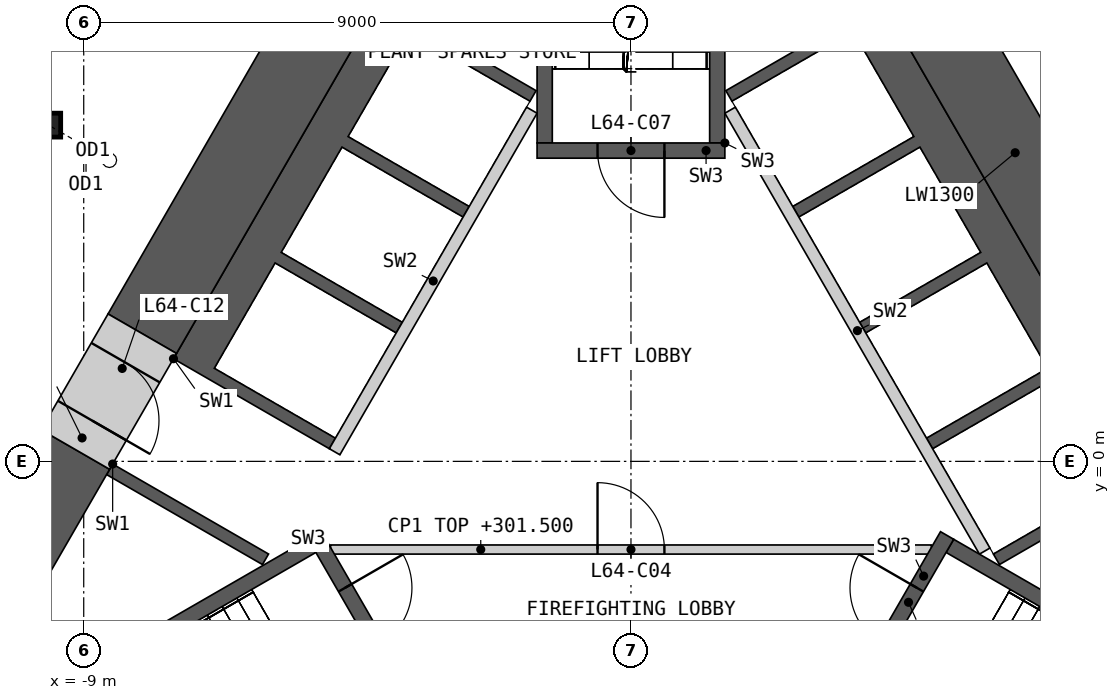
"""IFC4 building model, lengths in metres.
Left out: names, types, materials, properties, quantities, classifications, styles, units other than length and angle.
Written with IfcOpenShell. Run it as: python <this file> out.ifc"""

import sys

from ifc_helpers import new_model, si_unit, direction, frame, frame_2d, origin, origin_2d, place, context, subcontext, project, spatial, polyline, rectangle, i_section, outline, extrude, element, fill, save


model = new_model("IFC4")
c1 = context("Model", 3, precision=1e-05, world=origin(), true_north=direction((0.0, 1.0)))
c2 = subcontext(c1, "Body", "Model", "MODEL_VIEW")
j1 = project(units=[si_unit("LENGTHUNIT", "METRE"), si_unit("PLANEANGLEUNIT", "RADIAN")], contexts=[c1])
p1 = place(None, origin())
s1 = spatial("IfcSite", under=j1, at=p1, CompositionType="ELEMENT")
p2 = place(p1, origin())
s2 = spatial("IfcBuilding", under=s1, at=p2, CompositionType="ELEMENT")
p3 = place(p2, frame((0.0, 0.0, 287.8)))
s3 = spatial("IfcBuildingStorey", under=s2, at=p3, CompositionType="ELEMENT", Elevation=287.8)
p4 = place(p3, frame((-9.578, 5.53, 0.0), z_axis=(0.071186891711, -0.041085403321, 0.996616483951), x_axis=(0.499868889286, 0.866101087359, 0.0)))
e1 = element("IfcColumn", 1, at=p4, inside=s3, PredefinedType="COLUMN", context=c2, shape_type="SweptSolid", body=[
    extrude(i_section(OverallWidth=0.399, OverallDepth=0.393, WebThickness=0.023, FlangeThickness=0.037, at=origin_2d()), frame((0.0, 0.0, 0.016)), (0.0, 0.0, 1.0), 14.015),
])
p5 = place(p3, origin())
e2 = element("IfcWall", 2, at=p5, inside=s3, PredefinedType="SHEAR", context=c2, shape_type="SweptSolid", body=[
    extrude(outline(polyline([(4.124, 7.577), (8.624, -0.217), (8.231, -0.444), (6.061, -1.697), (5.96, -1.524), (7.952, -0.374), (6.952, 1.358), (4.96, 0.208), (4.861, 0.381), (6.852, 1.531), (5.852, 3.263), (3.861, 2.113), (3.76, 2.287), (5.752, 3.437), (4.752, 5.169), (2.76, 4.019), (2.66, 4.192), (4.652, 5.342), (3.652, 7.074), (1.66, 5.924), (1.561, 6.097), (3.731, 7.35), (4.124, 7.577)])), origin(), (0.0, 0.0, 1.0), 13.7),
])
p6 = place(p3, frame((5.817, -1.476, 0.0), z_axis=(0.0, 0.0, 1.0), x_axis=(-0.500002616675, 0.866023893041, 0.0)))
e3 = element("IfcWall", 3, at=p6, inside=s3, PredefinedType="SOLIDWALL", context=c2, shape_type="SweptSolid", body=[
    extrude(rectangle(XDim=8.373, YDim=0.2, at=frame_2d((4.187, 0.0))), origin(), (0.0, 0.0, 1.0), 13.7),
])
p7 = place(p3, origin())
e4 = element("IfcWall", 4, at=p7, inside=s3, PredefinedType="SHEAR", context=c2, shape_type="SweptSolid", body=[
    extrude(outline(polyline([(-7.524, 1.688), (-4.124, 7.577), (-3.731, 7.35), (-1.561, 6.097), (-1.66, 5.924), (-3.652, 7.074), (-4.652, 5.342), (-2.66, 4.192), (-2.76, 4.019), (-4.752, 5.169), (-5.752, 3.437), (-3.76, 2.287), (-3.861, 2.113), (-5.852, 3.263), (-6.852, 1.531), (-4.861, 0.381), (-4.96, 0.208), (-7.131, 1.461), (-7.524, 1.688)])), origin(), (0.0, 0.0, 1.0), 13.7),
])
p8 = place(p3, origin())
e5 = element("IfcWall", 5, at=p8, inside=s3, PredefinedType="SHEAR", context=c2, shape_type="SweptSolid", body=[
    extrude(outline(polyline([(-8.524, -0.044), (-8.131, -0.271), (-5.96, -1.524), (-6.061, -1.697), (-8.231, -0.444), (-8.624, -0.217), (-8.524, -0.044)])), origin(), (0.0, 0.0, 1.0), 13.7),
])
p9 = place(p3, frame((-1.631, 5.776, 0.0), z_axis=(0.0, 0.0, 1.0), x_axis=(-0.499992876559, -0.866029516466, 0.0)))
e6 = element("IfcWall", 6, at=p9, inside=s3, PredefinedType="SOLIDWALL", context=c2, shape_type="SweptSolid", body=[
    extrude(rectangle(XDim=6.486, YDim=0.2, at=frame_2d((3.243, 0.0))), origin(), (0.0, 0.0, 1.0), 13.7),
])
p10 = place(p3, frame((-4.941, -1.45, 0.0), z_axis=(0.0, 0.0, 1.0), x_axis=(1.0, 0.0, 0.0)))
e7 = element("IfcWall", 7, at=p10, inside=s3, PredefinedType="PARTITIONING", context=c2, shape_type="SweptSolid", body=[
    extrude(rectangle(XDim=9.882, YDim=0.15, at=frame_2d((4.941, 0.0))), origin(), (0.0, 0.0, 1.0), 13.7),
])
p11 = place(p10, frame((4.391, 0.0, 0.0)))
e8 = element("IfcOpeningElement", 8, at=p11, cuts=e7, PredefinedType="OPENING", context=c2, shape_type="SweptSolid", body=[
    extrude(rectangle(XDim=1.1, YDim=2.1, at=frame_2d((0.55, 1.05))), frame((0.0, 0.085, 0.0), z_axis=(0.0, -1.0, 0.0), x_axis=(1.0, 0.0, 0.0)), (0.0, 0.0, 1.0), 0.17),
])
p12 = place(p3, origin())
e9 = element("IfcWall", 9, at=p12, inside=s3, PredefinedType="SHEAR", context=c2, shape_type="SweptSolid", body=[
    extrude(outline(polyline([(-5.307, -1.281), (-10.374, -4.206), (-10.032, -4.298), (-5.182, -1.498), (-5.307, -1.281)])), origin(), (0.0, 0.0, 1.0), 13.7),
])
p13 = place(p3, frame((-5.199, -1.219, 0.0), z_axis=(0.0, 0.0, 1.0), x_axis=(0.499982516597, -0.866035497597, 0.0)))
e10 = element("IfcWall", 10, at=p13, inside=s3, PredefinedType="SHEAR", context=c2, shape_type="SweptSolid", body=[
    extrude(rectangle(XDim=3.088, YDim=0.25, at=frame_2d((1.544, 0.0))), origin(), (0.0, 0.0, 1.0), 13.7),
])
p14 = place(p13, frame((0.994, 0.0, 0.0)))
e11 = element("IfcOpeningElement", 11, at=p14, cuts=e10, PredefinedType="OPENING", context=c2, shape_type="SweptSolid", body=[
    extrude(rectangle(XDim=1.1, YDim=2.1, at=frame_2d((0.55, 1.05))), frame((0.0, 0.135, 0.0), z_axis=(0.0, -1.0, 0.0), x_axis=(1.0, 0.0, 0.0)), (0.0, 0.0, 1.0), 0.27),
])
p15 = place(p3, origin())
e12 = element("IfcWall", 12, at=p15, inside=s3, PredefinedType="SHEAR", context=c2, shape_type="SweptSolid", body=[
    extrude(outline(polyline([(10.032, -4.298), (10.374, -4.206), (5.307, -1.281), (5.182, -1.498), (10.032, -4.298)])), origin(), (0.0, 0.0, 1.0), 13.7),
])
p16 = place(p3, frame((3.655, -3.893, 0.0), z_axis=(0.0, 0.0, 1.0), x_axis=(0.499982516597, 0.866035497597, 0.0)))
e13 = element("IfcWall", 13, at=p16, inside=s3, PredefinedType="SHEAR", context=c2, shape_type="SweptSolid", body=[
    extrude(rectangle(XDim=3.088, YDim=0.25, at=frame_2d((1.544, 0.0))), origin(), (0.0, 0.0, 1.0), 13.7),
])
p17 = place(p16, frame((0.994, 0.0, 0.0)))
e14 = element("IfcOpeningElement", 14, at=p17, cuts=e13, PredefinedType="OPENING", context=c2, shape_type="SweptSolid", body=[
    extrude(rectangle(XDim=1.1, YDim=2.1, at=frame_2d((0.55, 1.05))), frame((0.0, 0.135, 0.0), z_axis=(0.0, -1.0, 0.0), x_axis=(1.0, 0.0, 0.0)), (0.0, 0.0, 1.0), 0.27),
])
p18 = place(p3, origin())
e15 = element("IfcWall", 15, at=p18, inside=s3, PredefinedType="SHEAR", context=c2, shape_type="SweptSolid", body=[
    extrude(outline(polyline([(1.544, 5.237), (1.544, 11.087), (1.294, 10.837), (1.294, 5.237), (1.544, 5.237)])), origin(), (0.0, 0.0, 1.0), 13.7),
])
p19 = place(p3, origin())
e16 = element("IfcWall", 16, at=p19, inside=s3, PredefinedType="SHEAR", context=c2, shape_type="SweptSolid", body=[
    extrude(outline(polyline([(-1.294, 10.837), (-1.544, 11.087), (-1.544, 5.237), (-1.294, 5.237), (-1.294, 10.837)])), origin(), (0.0, 0.0, 1.0), 13.7),
])
p20 = place(p3, frame((1.544, 5.112, 0.0), z_axis=(0.0, 0.0, 1.0), x_axis=(-1.0, 0.0, 0.0)))
e17 = element("IfcWall", 17, at=p20, inside=s3, PredefinedType="SHEAR", context=c2, shape_type="SweptSolid", body=[
    extrude(rectangle(XDim=3.088, YDim=0.25, at=frame_2d((1.544, 0.0))), origin(), (0.0, 0.0, 1.0), 13.7),
])
p21 = place(p20, frame((0.994, 0.0, 0.0)))
e18 = element("IfcOpeningElement", 18, at=p21, cuts=e17, PredefinedType="OPENING", context=c2, shape_type="SweptSolid", body=[
    extrude(rectangle(XDim=1.1, YDim=2.1, at=frame_2d((0.55, 1.05))), frame((0.0, 0.135, 0.0), z_axis=(0.0, -1.0, 0.0), x_axis=(1.0, 0.0, 0.0)), (0.0, 0.0, 1.0), 0.27),
])
p22 = place(p3, frame((10.081, -1.441, 0.0), z_axis=(0.0, 0.0, 1.0), x_axis=(-0.500012180433, 0.866018371294, 0.0)))
e19 = element("IfcWall", 19, at=p22, inside=s3, PredefinedType="SHEAR", context=c2, shape_type="SweptSolid", body=[
    extrude(rectangle(XDim=15.05, YDim=1.3, at=frame_2d((7.525, 0.0))), origin(), (0.0, 0.0, 1.0), 13.7),
])
p23 = place(p3, frame((-4.636, 7.99, 0.0), z_axis=(0.0, 0.0, 1.0), x_axis=(-0.500022813292, -0.866012232124, 0.0)))
e20 = element("IfcWall", 20, at=p23, inside=s3, PredefinedType="SHEAR", context=c2, shape_type="SweptSolid", body=[
    extrude(rectangle(XDim=6.802, YDim=1.3, at=frame_2d((3.401, 0.0))), origin(), (0.0, 0.0, 1.0), 13.7),
])
p24 = place(p3, frame((-9.137, 0.195, 0.0), z_axis=(0.0, 0.0, 1.0), x_axis=(-0.499985697398, -0.866033661238, 0.0)))
e21 = element("IfcWall", 21, at=p24, inside=s3, PredefinedType="SHEAR", context=c2, shape_type="SweptSolid", body=[
    extrude(rectangle(XDim=4.362, YDim=1.3, at=frame_2d((2.181, 0.0))), origin(), (0.0, 0.0, 1.0), 13.7),
])
p25 = place(p3, frame((-8.037, 2.1, 0.0), z_axis=(0.0, 0.0, 1.0), x_axis=(-0.50002983664, -0.866008176907, 0.0)))
e22 = element("IfcWall", 22, at=p25, inside=s3, PredefinedType="SHEAR", context=c2, shape_type="SweptSolid", body=[
    extrude(rectangle(XDim=2.2, YDim=1.3, at=frame_2d((1.1, 0.0))), origin(), (0.0, 0.0, 1.0), 13.7),
])
p26 = place(p25, frame((0.55, 0.0, 0.0)))
e23 = element("IfcOpeningElement", 23, at=p26, cuts=e22, PredefinedType="OPENING", context=c2, shape_type="SweptSolid", body=[
    extrude(rectangle(XDim=1.1, YDim=2.1, at=frame_2d((0.55, 1.05))), frame((0.0, 0.66, 0.0), z_axis=(0.0, -1.0, 0.0), x_axis=(1.0, 0.0, 0.0)), (0.0, 0.0, 1.0), 1.32),
])
p27 = place(p3, frame((-18.118, -6.06, 0.0), z_axis=(0.0, 0.0, 1.0), x_axis=(0.49999867524, 0.866026168633, 0.0)))
e24 = element("IfcWall", 24, at=p27, inside=s3, PredefinedType="PARTITIONING", context=c2, shape_type="SweptSolid", body=[
    extrude(rectangle(XDim=28.614, YDim=0.2, at=frame_2d((14.307, 0.0))), origin(), (0.0, 0.0, 1.0), 13.7),
])
p28 = place(p27, frame((1.351, 0.0, 0.0)))
e25 = element("IfcOpeningElement", 25, at=p28, cuts=e24, PredefinedType="OPENING", context=c2, shape_type="SweptSolid", body=[
    extrude(rectangle(XDim=1.2, YDim=2.1, at=frame_2d((0.6, 1.05))), frame((0.0, 0.11, 0.0), z_axis=(0.0, -1.0, 0.0), x_axis=(1.0, 0.0, 0.0)), (0.0, 0.0, 1.0), 0.22),
])
p29 = place(p27, frame((5.953, 0.0, 0.0)))
e26 = element("IfcOpeningElement", 26, at=p29, cuts=e24, PredefinedType="OPENING", context=c2, shape_type="SweptSolid", body=[
    extrude(rectangle(XDim=1.2, YDim=2.1, at=frame_2d((0.6, 1.05))), frame((0.0, 0.11, 0.0), z_axis=(0.0, -1.0, 0.0), x_axis=(1.0, 0.0, 0.0)), (0.0, 0.0, 1.0), 0.22),
])
p30 = place(p27, frame((11.156, 0.0, 0.0)))
e27 = element("IfcOpeningElement", 27, at=p30, cuts=e24, PredefinedType="OPENING", context=c2, shape_type="SweptSolid", body=[
    extrude(rectangle(XDim=1.2, YDim=2.1, at=frame_2d((0.6, 1.05))), frame((0.0, 0.11, 0.0), z_axis=(0.0, -1.0, 0.0), x_axis=(1.0, 0.0, 0.0)), (0.0, 0.0, 1.0), 0.22),
])
p31 = place(p27, frame((16.259, 0.0, 0.0)))
e28 = element("IfcOpeningElement", 28, at=p31, cuts=e24, PredefinedType="OPENING", context=c2, shape_type="SweptSolid", body=[
    extrude(rectangle(XDim=1.2, YDim=2.1, at=frame_2d((0.6, 1.05))), frame((0.0, 0.11, 0.0), z_axis=(0.0, -1.0, 0.0), x_axis=(1.0, 0.0, 0.0)), (0.0, 0.0, 1.0), 0.22),
])
p32 = place(p27, frame((21.461, 0.0, 0.0)))
e29 = element("IfcOpeningElement", 29, at=p32, cuts=e24, PredefinedType="OPENING", context=c2, shape_type="SweptSolid", body=[
    extrude(rectangle(XDim=1.2, YDim=2.1, at=frame_2d((0.6, 1.05))), frame((0.0, 0.11, 0.0), z_axis=(0.0, -1.0, 0.0), x_axis=(1.0, 0.0, 0.0)), (0.0, 0.0, 1.0), 0.22),
])
p33 = place(p27, frame((26.064, 0.0, 0.0)))
e30 = element("IfcOpeningElement", 30, at=p33, cuts=e24, PredefinedType="OPENING", context=c2, shape_type="SweptSolid", body=[
    extrude(rectangle(XDim=1.2, YDim=2.1, at=frame_2d((0.6, 1.05))), frame((0.0, 0.11, 0.0), z_axis=(0.0, -1.0, 0.0), x_axis=(1.0, 0.0, 0.0)), (0.0, 0.0, 1.0), 0.22),
])
p34 = place(p3, frame((3.811, 18.72, 0.0), z_axis=(0.0, 0.0, 1.0), x_axis=(0.49999867524, -0.866026168633, 0.0)))
e31 = element("IfcWall", 31, at=p34, inside=s3, PredefinedType="PARTITIONING", context=c2, shape_type="SweptSolid", body=[
    extrude(rectangle(XDim=28.614, YDim=0.2, at=frame_2d((14.307, 0.0))), origin(), (0.0, 0.0, 1.0), 13.7),
])
p35 = place(p34, frame((26.064, 0.0, 0.0)))
e32 = element("IfcOpeningElement", 32, at=p35, cuts=e31, PredefinedType="OPENING", context=c2, shape_type="SweptSolid", body=[
    extrude(rectangle(XDim=1.2, YDim=2.1, at=frame_2d((0.6, 1.05))), frame((0.0, 0.11, 0.0), z_axis=(0.0, -1.0, 0.0), x_axis=(1.0, 0.0, 0.0)), (0.0, 0.0, 1.0), 0.22),
])
p36 = place(p34, frame((21.461, 0.0, 0.0)))
e33 = element("IfcOpeningElement", 33, at=p36, cuts=e31, PredefinedType="OPENING", context=c2, shape_type="SweptSolid", body=[
    extrude(rectangle(XDim=1.2, YDim=2.1, at=frame_2d((0.6, 1.05))), frame((0.0, 0.11, 0.0), z_axis=(0.0, -1.0, 0.0), x_axis=(1.0, 0.0, 0.0)), (0.0, 0.0, 1.0), 0.22),
])
p37 = place(p34, frame((16.259, 0.0, 0.0)))
e34 = element("IfcOpeningElement", 34, at=p37, cuts=e31, PredefinedType="OPENING", context=c2, shape_type="SweptSolid", body=[
    extrude(rectangle(XDim=1.2, YDim=2.1, at=frame_2d((0.6, 1.05))), frame((0.0, 0.11, 0.0), z_axis=(0.0, -1.0, 0.0), x_axis=(1.0, 0.0, 0.0)), (0.0, 0.0, 1.0), 0.22),
])
p38 = place(p34, frame((11.156, 0.0, 0.0)))
e35 = element("IfcOpeningElement", 35, at=p38, cuts=e31, PredefinedType="OPENING", context=c2, shape_type="SweptSolid", body=[
    extrude(rectangle(XDim=1.2, YDim=2.1, at=frame_2d((0.6, 1.05))), frame((0.0, 0.11, 0.0), z_axis=(0.0, -1.0, 0.0), x_axis=(1.0, 0.0, 0.0)), (0.0, 0.0, 1.0), 0.22),
])
p39 = place(p34, frame((5.953, 0.0, 0.0)))
e36 = element("IfcOpeningElement", 36, at=p39, cuts=e31, PredefinedType="OPENING", context=c2, shape_type="SweptSolid", body=[
    extrude(rectangle(XDim=1.2, YDim=2.1, at=frame_2d((0.6, 1.05))), frame((0.0, 0.11, 0.0), z_axis=(0.0, -1.0, 0.0), x_axis=(1.0, 0.0, 0.0)), (0.0, 0.0, 1.0), 0.22),
])
p40 = place(p34, frame((1.351, 0.0, 0.0)))
e37 = element("IfcOpeningElement", 37, at=p40, cuts=e31, PredefinedType="OPENING", context=c2, shape_type="SweptSolid", body=[
    extrude(rectangle(XDim=1.2, YDim=2.1, at=frame_2d((0.6, 1.05))), frame((0.0, 0.11, 0.0), z_axis=(0.0, -1.0, 0.0), x_axis=(1.0, 0.0, 0.0)), (0.0, 0.0, 1.0), 0.22),
])
p41 = place(p11, origin())
e38 = element("IfcDoor", 38, at=p41, inside=s3, OperationType="SINGLE_SWING_LEFT", PredefinedType="DOOR", context=c2, shape_type="SweptSolid", body=[
    extrude(rectangle(XDim=1.1, YDim=2.1, at=frame_2d((0.55, 1.05))), frame((0.0, 0.025, 0.0), z_axis=(0.0, -1.0, 0.0), x_axis=(1.0, 0.0, 0.0)), (0.0, 0.0, 1.0), 0.05),
])
fill(e8, e38)
p42 = place(p14, origin())
e39 = element("IfcDoor", 39, at=p42, inside=s3, OperationType="SINGLE_SWING_LEFT", PredefinedType="DOOR", context=c2, shape_type="SweptSolid", body=[
    extrude(rectangle(XDim=1.1, YDim=2.1, at=frame_2d((0.55, 1.05))), frame((0.0, 0.025, 0.0), z_axis=(0.0, -1.0, 0.0), x_axis=(1.0, 0.0, 0.0)), (0.0, 0.0, 1.0), 0.05),
])
fill(e11, e39)
p43 = place(p17, origin())
e40 = element("IfcDoor", 40, at=p43, inside=s3, OperationType="SINGLE_SWING_RIGHT", PredefinedType="DOOR", context=c2, shape_type="SweptSolid", body=[
    extrude(rectangle(XDim=1.1, YDim=2.1, at=frame_2d((0.55, 1.05))), frame((0.0, 0.025, 0.0), z_axis=(0.0, -1.0, 0.0), x_axis=(1.0, 0.0, 0.0)), (0.0, 0.0, 1.0), 0.05),
])
fill(e14, e40)
p44 = place(p21, origin())
e41 = element("IfcDoor", 41, at=p44, inside=s3, OperationType="SINGLE_SWING_LEFT", PredefinedType="DOOR", context=c2, shape_type="SweptSolid", body=[
    extrude(rectangle(XDim=1.1, YDim=2.1, at=frame_2d((0.55, 1.05))), frame((0.0, 0.025, 0.0), z_axis=(0.0, -1.0, 0.0), x_axis=(1.0, 0.0, 0.0)), (0.0, 0.0, 1.0), 0.05),
])
fill(e18, e41)
p45 = place(p26, origin())
e42 = element("IfcDoor", 42, at=p45, inside=s3, OperationType="SINGLE_SWING_RIGHT", PredefinedType="DOOR", context=c2, shape_type="SweptSolid", body=[
    extrude(rectangle(XDim=1.1, YDim=2.1, at=frame_2d((0.55, 1.05))), frame((0.0, 0.405, 0.0), z_axis=(0.0, -1.0, 0.0), x_axis=(1.0, 0.0, 0.0)), (0.0, 0.0, 1.0), 0.05),
])
fill(e23, e42)
save(model, sys.argv[1])
